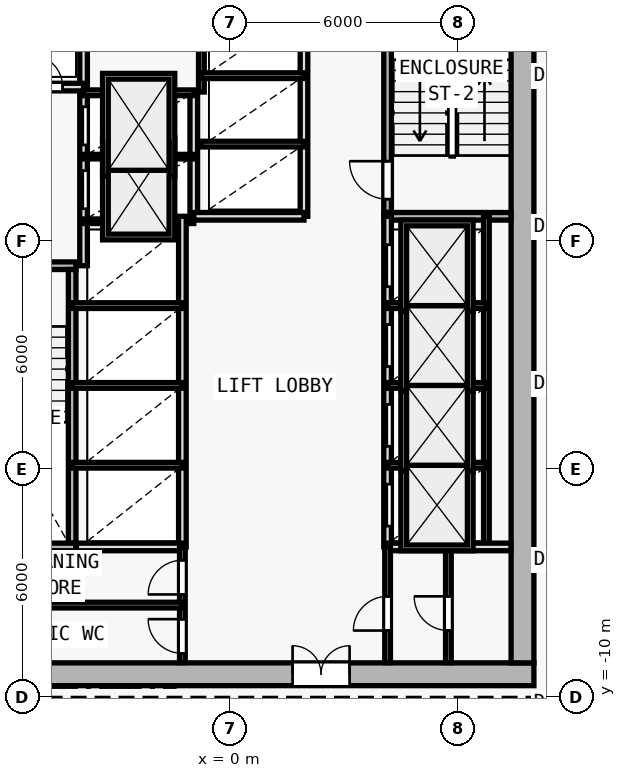
"""IFC4 building model, lengths in metres.
Left out: names, types, materials, properties, quantities, classifications, styles, units other than length and angle.
Written with IfcOpenShell. Run it as: python <this file> out.ifc"""

import sys

from ifc_helpers import new_model, si_unit, direction, frame, frame_2d, origin, origin_2d, place, context, subcontext, project, spatial, rectangle, i_section, extrude, element, fill, save


model = new_model("IFC4")
c1 = context("Model", 3, precision=1e-05, world=origin(), true_north=direction((0.0, 1.0)))
c2 = subcontext(c1, "Body", "Model", "MODEL_VIEW")
j1 = project(units=[si_unit("LENGTHUNIT", "METRE"), si_unit("PLANEANGLEUNIT", "RADIAN")], contexts=[c1])
p1 = place(None, origin())
s1 = spatial("IfcSite", under=j1, at=p1, CompositionType="ELEMENT")
p2 = place(p1, origin())
s2 = spatial("IfcBuilding", under=s1, at=p2, CompositionType="ELEMENT")
p3 = place(p2, frame((0.0, 0.0, 66.0)))
s3 = spatial("IfcBuildingStorey", under=s2, at=p3, CompositionType="ELEMENT", Elevation=66.0)
for number, where, z_axis, x_axis in (
    (1, (7.7, -9.4, 0.0), (0.0, 0.0, 1.0), (1.0, 0.0, 0.0)),
    (2, (0.0, -9.4, 0.0), (0.0, 0.0, 1.0), (1.0, 0.0, 0.0)),
    (3, (7.7, 0.4, 0.0), (0.0, 0.0, 1.0), (1.0, 0.0, 0.0)),
):
    element("IfcColumn", number, at=place(p3, frame(where, z_axis=z_axis, x_axis=x_axis)), inside=s3, PredefinedType="COLUMN", context=c2, shape_type="SweptSolid", body=[
        extrude(i_section(OverallWidth=0.416, OverallDepth=0.446, WebThickness=0.025, FlangeThickness=0.04, FilletRadius=0.015, at=origin_2d()), origin(), (0.0, 0.0, 1.0), 3.6),
    ])
p4 = place(p3, frame((-8.0, -9.4, 0.0), z_axis=(0.0, 0.0, 1.0), x_axis=(1.0, 0.0, 0.0)))
e4 = element("IfcWall", 4, at=p4, inside=s3, PredefinedType="SHEAR", context=c2, shape_type="SweptSolid", body=[
    extrude(rectangle(XDim=16.0, YDim=0.6, at=frame_2d((8.0, 0.0))), origin(), (0.0, 0.0, 1.0), 3.35),
])
p5 = place(p4, frame((9.65, 0.0, 0.0)))
e5 = element("IfcOpeningElement", 5, at=p5, cuts=e4, PredefinedType="OPENING", context=c2, shape_type="SweptSolid", body=[
    extrude(rectangle(XDim=1.5, YDim=2.2, at=frame_2d((0.75, 1.1))), frame((0.0, 0.31, 0.0), z_axis=(0.0, -1.0, 0.0), x_axis=(1.0, 0.0, 0.0)), (0.0, 0.0, 1.0), 0.62),
])
p6 = place(p3, frame((7.7, 9.9, 0.0), z_axis=(0.0, 0.0, 1.0), x_axis=(0.0, -1.0, 0.0)))
e6 = element("IfcWall", 6, at=p6, inside=s3, PredefinedType="SHEAR", context=c2, shape_type="SweptSolid", body=[
    extrude(rectangle(XDim=19.0, YDim=0.6, at=frame_2d((9.5, 0.0))), origin(), (0.0, 0.0, 1.0), 3.35),
])
p7 = place(p3, frame((-7.4, 1.35, 0.0), z_axis=(0.0, 0.0, 1.0), x_axis=(1.0, 0.0, 0.0)))
e7 = element("IfcWall", 7, at=p7, inside=s3, PredefinedType="SOLIDWALL", context=c2, shape_type="SweptSolid", body=[
    extrude(rectangle(XDim=3.35, YDim=0.2, at=frame_2d((1.675, 0.0))), origin(), (0.0, 0.0, 1.0), 3.35),
])
p8 = place(p7, frame((0.65, 0.0, 0.0)))
e8 = element("IfcOpeningElement", 8, at=p8, cuts=e7, PredefinedType="OPENING", context=c2, shape_type="SweptSolid", body=[
    extrude(rectangle(XDim=1.0, YDim=2.15, at=frame_2d((0.5, 1.075))), frame((0.0, 0.11, 0.0), z_axis=(0.0, -1.0, 0.0), x_axis=(1.0, 0.0, 0.0)), (0.0, 0.0, 1.0), 0.22),
])
p9 = place(p3, frame((-4.15, -5.95, 0.0), z_axis=(0.0, 0.0, 1.0), x_axis=(0.0, 1.0, 0.0)))
e9 = element("IfcWall", 9, at=p9, inside=s3, PredefinedType="SOLIDWALL", context=c2, shape_type="SweptSolid", body=[
    extrude(rectangle(XDim=7.2, YDim=0.2, at=frame_2d((3.6, 0.0))), origin(), (0.0, 0.0, 1.0), 3.35),
])
p10 = place(p3, frame((-3.85, 1.35, 0.0), z_axis=(0.0, 0.0, 1.0), x_axis=(0.0, 1.0, 0.0)))
e10 = element("IfcWall", 10, at=p10, inside=s3, PredefinedType="SOLIDWALL", context=c2, shape_type="SweptSolid", body=[
    extrude(rectangle(XDim=8.545, YDim=0.2, at=frame_2d((4.272, 0.0))), origin(), (0.0, 0.0, 1.0), 3.35),
])
p11 = place(p10, frame((1.5, 0.0, 0.0)))
e11 = element("IfcOpeningElement", 11, at=p11, cuts=e10, PredefinedType="OPENING", context=c2, shape_type="SweptSolid", body=[
    extrude(rectangle(XDim=1.0, YDim=2.15, at=frame_2d((0.5, 1.075))), frame((0.0, 0.11, 0.0), z_axis=(0.0, -1.0, 0.0), x_axis=(1.0, 0.0, 0.0)), (0.0, 0.0, 1.0), 0.22),
])
p12 = place(p10, frame((3.18, 0.0, 0.0)))
e12 = element("IfcOpeningElement", 12, at=p12, cuts=e10, PredefinedType="OPENING", context=c2, shape_type="SweptSolid", body=[
    extrude(rectangle(XDim=1.0, YDim=2.15, at=frame_2d((0.5, 1.075))), frame((0.0, 0.11, 0.0), z_axis=(0.0, -1.0, 0.0), x_axis=(1.0, 0.0, 0.0)), (0.0, 0.0, 1.0), 0.22),
])
p13 = place(p3, frame((-7.395, 6.05, 0.0), z_axis=(0.0, 0.0, 1.0), x_axis=(1.0, 0.0, 0.0)))
e13 = element("IfcWall", 13, at=p13, inside=s3, PredefinedType="SOLIDWALL", context=c2, shape_type="SweptSolid", body=[
    extrude(rectangle(XDim=3.545, YDim=0.2, at=frame_2d((1.772, 0.0))), origin(), (0.0, 0.0, 1.0), 3.35),
])
p14 = place(p13, frame((0.345, 0.0, 0.0)))
e14 = element("IfcOpeningElement", 14, at=p14, cuts=e13, PredefinedType="OPENING", context=c2, shape_type="SweptSolid", body=[
    extrude(rectangle(XDim=0.85, YDim=2.1, at=frame_2d((0.425, 1.05))), frame((0.0, 0.11, 0.0), z_axis=(0.0, -1.0, 0.0), x_axis=(1.0, 0.0, 0.0)), (0.0, 0.0, 1.0), 0.22),
])
p15 = place(p13, frame((2.145, 0.0, 0.0)))
e15 = element("IfcOpeningElement", 15, at=p15, cuts=e13, PredefinedType="OPENING", context=c2, shape_type="SweptSolid", body=[
    extrude(rectangle(XDim=0.85, YDim=2.1, at=frame_2d((0.425, 1.05))), frame((0.0, 0.11, 0.0), z_axis=(0.0, -1.0, 0.0), x_axis=(1.0, 0.0, 0.0)), (0.0, 0.0, 1.0), 0.22),
])
p16 = place(p3, frame((4.15, 2.75, 0.0), z_axis=(0.0, 0.0, 1.0), x_axis=(0.0, 1.0, 0.0)))
e16 = element("IfcWall", 16, at=p16, inside=s3, PredefinedType="SOLIDWALL", context=c2, shape_type="SweptSolid", body=[
    extrude(rectangle(XDim=7.15, YDim=0.2, at=frame_2d((3.575, 0.0))), origin(), (0.0, 0.0, 1.0), 3.35),
])
p17 = place(p16, frame((0.35, 0.0, 0.0)))
e17 = element("IfcOpeningElement", 17, at=p17, cuts=e16, PredefinedType="OPENING", context=c2, shape_type="SweptSolid", body=[
    extrude(rectangle(XDim=1.0, YDim=2.15, at=frame_2d((0.5, 1.075))), frame((0.0, 0.11, 0.0), z_axis=(0.0, -1.0, 0.0), x_axis=(1.0, 0.0, 0.0)), (0.0, 0.0, 1.0), 0.22),
])
p18 = place(p3, frame((4.05, 2.65, 0.0), z_axis=(0.0, 0.0, 1.0), x_axis=(1.0, 0.0, 0.0)))
e18 = element("IfcWall", 18, at=p18, inside=s3, PredefinedType="SOLIDWALL", context=c2, shape_type="SweptSolid", body=[
    extrude(rectangle(XDim=3.35, YDim=0.2, at=frame_2d((1.675, 0.0))), origin(), (0.0, 0.0, 1.0), 3.35),
])
p19 = place(p3, frame((-0.95, 2.65, 0.0), z_axis=(0.0, 0.0, 1.0), x_axis=(0.0, 1.0, 0.0)))
e19 = element("IfcWall", 19, at=p19, inside=s3, PredefinedType="SOLIDWALL", context=c2, shape_type="SweptSolid", body=[
    extrude(rectangle(XDim=3.27, YDim=0.2, at=frame_2d((1.635, 0.0))), origin(), (0.0, 0.0, 1.0), 3.35),
])
for number, where, z_axis, x_axis in (
    (20, (-3.85, 2.52, 0.0), (0.0, 0.0, 1.0), (1.0, 0.0, 0.0)),
    (21, (-3.85, 4.22, 0.0), (0.0, 0.0, 1.0), (1.0, 0.0, 0.0)),
):
    element("IfcWall", number, at=place(p3, frame(where, z_axis=z_axis, x_axis=x_axis)), inside=s3, PredefinedType="PARTITIONING", context=c2, shape_type="SweptSolid", body=[
        extrude(rectangle(XDim=2.9, YDim=0.12, at=frame_2d((1.45, 0.0))), origin(), (0.0, 0.0, 1.0), 3.35),
    ])
p20 = place(p3, frame((-3.85, 5.9, 0.0), z_axis=(0.0, 0.0, 1.0), x_axis=(1.0, 0.0, 0.0)))
e22 = element("IfcWall", 22, at=p20, inside=s3, PredefinedType="PARTITIONING", context=c2, shape_type="SweptSolid", body=[
    extrude(rectangle(XDim=2.9, YDim=0.15, at=frame_2d((1.45, 0.0))), origin(), (0.0, 0.0, 1.0), 3.35),
])
p21 = place(p3, frame((4.15, -6.05, 0.0), z_axis=(0.0, 0.0, 1.0), x_axis=(0.0, 1.0, 0.0)))
e23 = element("IfcWall", 23, at=p21, inside=s3, PredefinedType="SOLIDWALL", context=c2, shape_type="SweptSolid", body=[
    extrude(rectangle(XDim=8.7, YDim=0.2, at=frame_2d((4.35, 0.0))), origin(), (0.0, 0.0, 1.0), 3.35),
])
p22 = place(p21, frame((0.55, 0.0, 0.0)))
e24 = element("IfcOpeningElement", 24, at=p22, cuts=e23, PredefinedType="OPENING", context=c2, shape_type="SweptSolid", body=[
    extrude(rectangle(XDim=1.1, YDim=2.15, at=frame_2d((0.55, 1.075))), frame((0.0, 0.11, 0.0), z_axis=(0.0, -1.0, 0.0), x_axis=(1.0, 0.0, 0.0)), (0.0, 0.0, 1.0), 0.22),
])
p23 = place(p21, frame((2.65, 0.0, 0.0)))
e25 = element("IfcOpeningElement", 25, at=p23, cuts=e23, PredefinedType="OPENING", context=c2, shape_type="SweptSolid", body=[
    extrude(rectangle(XDim=1.1, YDim=2.15, at=frame_2d((0.55, 1.075))), frame((0.0, 0.11, 0.0), z_axis=(0.0, -1.0, 0.0), x_axis=(1.0, 0.0, 0.0)), (0.0, 0.0, 1.0), 0.22),
])
p24 = place(p21, frame((4.75, 0.0, 0.0)))
e26 = element("IfcOpeningElement", 26, at=p24, cuts=e23, PredefinedType="OPENING", context=c2, shape_type="SweptSolid", body=[
    extrude(rectangle(XDim=1.1, YDim=2.15, at=frame_2d((0.55, 1.075))), frame((0.0, 0.11, 0.0), z_axis=(0.0, -1.0, 0.0), x_axis=(1.0, 0.0, 0.0)), (0.0, 0.0, 1.0), 0.22),
])
p25 = place(p21, frame((6.85, 0.0, 0.0)))
e27 = element("IfcOpeningElement", 27, at=p25, cuts=e23, PredefinedType="OPENING", context=c2, shape_type="SweptSolid", body=[
    extrude(rectangle(XDim=1.1, YDim=2.15, at=frame_2d((0.55, 1.075))), frame((0.0, 0.11, 0.0), z_axis=(0.0, -1.0, 0.0), x_axis=(1.0, 0.0, 0.0)), (0.0, 0.0, 1.0), 0.22),
])
p26 = place(p3, frame((6.75, -6.05, 0.0), z_axis=(0.0, 0.0, 1.0), x_axis=(0.0, 1.0, 0.0)))
e28 = element("IfcWall", 28, at=p26, inside=s3, PredefinedType="PARTITIONING", context=c2, shape_type="SweptSolid", body=[
    extrude(rectangle(XDim=8.7, YDim=0.15, at=frame_2d((4.35, 0.0))), origin(), (0.0, 0.0, 1.0), 3.35),
])
for number, where, z_axis, x_axis in (
    (29, (4.15, -3.9, 0.0), (0.0, 0.0, 1.0), (1.0, 0.0, 0.0)),
    (30, (4.15, -1.8, 0.0), (0.0, 0.0, 1.0), (1.0, 0.0, 0.0)),
    (31, (4.15, 0.3, 0.0), (0.0, 0.0, 1.0), (1.0, 0.0, 0.0)),
):
    element("IfcWall", number, at=place(p3, frame(where, z_axis=z_axis, x_axis=x_axis)), inside=s3, PredefinedType="PARTITIONING", context=c2, shape_type="SweptSolid", body=[
        extrude(rectangle(XDim=2.6, YDim=0.15, at=frame_2d((1.3, 0.0))), origin(), (0.0, 0.0, 1.0), 3.35),
    ])
p27 = place(p3, frame((-1.25, -6.05, 0.0), z_axis=(0.0, 0.0, 1.0), x_axis=(0.0, 1.0, 0.0)))
e32 = element("IfcWall", 32, at=p27, inside=s3, PredefinedType="SOLIDWALL", context=c2, shape_type="SweptSolid", body=[
    extrude(rectangle(XDim=8.7, YDim=0.2, at=frame_2d((4.35, 0.0))), origin(), (0.0, 0.0, 1.0), 3.35),
])
for number, where, z_axis, x_axis in (
    (33, (-4.15, -3.9, 0.0), (0.0, 0.0, 1.0), (1.0, 0.0, 0.0)),
    (34, (-4.15, -1.8, 0.0), (0.0, 0.0, 1.0), (1.0, 0.0, 0.0)),
    (35, (-4.15, 0.3, 0.0), (0.0, 0.0, 1.0), (1.0, 0.0, 0.0)),
):
    element("IfcWall", number, at=place(p3, frame(where, z_axis=z_axis, x_axis=x_axis)), inside=s3, PredefinedType="PARTITIONING", context=c2, shape_type="SweptSolid", body=[
        extrude(rectangle(XDim=2.9, YDim=0.15, at=frame_2d((1.45, 0.0))), origin(), (0.0, 0.0, 1.0), 3.35),
    ])
p28 = place(p3, frame((1.95, 2.65, 0.0), z_axis=(0.0, 0.0, 1.0), x_axis=(0.0, 1.0, 0.0)))
e36 = element("IfcWall", 36, at=p28, inside=s3, PredefinedType="SOLIDWALL", context=c2, shape_type="SweptSolid", body=[
    extrude(rectangle(XDim=7.245, YDim=0.2, at=frame_2d((3.623, 0.0))), origin(), (0.0, 0.0, 1.0), 3.35),
])
p29 = place(p3, frame((-0.95, 2.65, 0.0), z_axis=(0.0, 0.0, 1.0), x_axis=(1.0, 0.0, 0.0)))
e37 = element("IfcWall", 37, at=p29, inside=s3, PredefinedType="SOLIDWALL", context=c2, shape_type="SweptSolid", body=[
    extrude(rectangle(XDim=2.9, YDim=0.2, at=frame_2d((1.45, 0.0))), origin(), (0.0, 0.0, 1.0), 3.35),
])
p30 = place(p3, frame((-0.75, 5.92, 0.0), z_axis=(0.0, 0.0, 1.0), x_axis=(0.0, 1.0, 0.0)))
e38 = element("IfcWall", 38, at=p30, inside=s3, PredefinedType="PARTITIONING", context=c2, shape_type="SweptSolid", body=[
    extrude(rectangle(XDim=3.975, YDim=0.15, at=frame_2d((1.988, 0.0))), origin(), (0.0, 0.0, 1.0), 3.35),
])
for number, where, z_axis, x_axis in (
    (39, (-0.75, 4.55, 0.0), (0.0, 0.0, 1.0), (1.0, 0.0, 0.0)),
    (40, (-0.75, 6.35, 0.0), (0.0, 0.0, 1.0), (1.0, 0.0, 0.0)),
):
    element("IfcWall", number, at=place(p3, frame(where, z_axis=z_axis, x_axis=x_axis)), inside=s3, PredefinedType="PARTITIONING", context=c2, shape_type="SweptSolid", body=[
        extrude(rectangle(XDim=2.7, YDim=0.15, at=frame_2d((1.35, 0.0))), origin(), (0.0, 0.0, 1.0), 3.35),
    ])
p31 = place(p3, frame((-7.4, -6.05, 0.0), z_axis=(0.0, 0.0, 1.0), x_axis=(1.0, 0.0, 0.0)))
e41 = element("IfcWall", 41, at=p31, inside=s3, PredefinedType="SOLIDWALL", context=c2, shape_type="SweptSolid", body=[
    extrude(rectangle(XDim=3.35, YDim=0.2, at=frame_2d((1.675, 0.0))), origin(), (0.0, 0.0, 1.0), 3.35),
])
p32 = place(p3, frame((-4.04, -6.05, 0.0), z_axis=(0.0, 0.0, 1.0), x_axis=(1.0, 0.0, 0.0)))
e42 = element("IfcWall", 42, at=p32, inside=s3, PredefinedType="SOLIDWALL", context=c2, shape_type="SweptSolid", body=[
    extrude(rectangle(XDim=2.79, YDim=0.2, at=frame_2d((1.395, 0.0))), origin(), (0.0, 0.0, 1.0), 3.35),
])
p33 = place(p3, frame((4.15, -6.05, 0.0), z_axis=(0.0, 0.0, 1.0), x_axis=(1.0, 0.0, 0.0)))
e43 = element("IfcWall", 43, at=p33, inside=s3, PredefinedType="SOLIDWALL", context=c2, shape_type="SweptSolid", body=[
    extrude(rectangle(XDim=3.245, YDim=0.2, at=frame_2d((1.623, 0.0))), origin(), (0.0, 0.0, 1.0), 3.35),
])
p34 = place(p3, frame((-1.25, -9.095, 0.0), z_axis=(0.0, 0.0, 1.0), x_axis=(0.0, 1.0, 0.0)))
e44 = element("IfcWall", 44, at=p34, inside=s3, PredefinedType="PARTITIONING", context=c2, shape_type="SweptSolid", body=[
    extrude(rectangle(XDim=3.045, YDim=0.15, at=frame_2d((1.522, 0.0))), origin(), (0.0, 0.0, 1.0), 3.35),
])
p35 = place(p34, frame((1.795, 0.0, 0.0)))
e45 = element("IfcOpeningElement", 45, at=p35, cuts=e44, PredefinedType="OPENING", context=c2, shape_type="SweptSolid", body=[
    extrude(rectangle(XDim=0.9, YDim=2.1, at=frame_2d((0.45, 1.05))), frame((0.0, 0.085, 0.0), z_axis=(0.0, -1.0, 0.0), x_axis=(1.0, 0.0, 0.0)), (0.0, 0.0, 1.0), 0.17),
])
p36 = place(p34, frame((0.245, 0.0, 0.0)))
e46 = element("IfcOpeningElement", 46, at=p36, cuts=e44, PredefinedType="OPENING", context=c2, shape_type="SweptSolid", body=[
    extrude(rectangle(XDim=0.9, YDim=2.1, at=frame_2d((0.45, 1.05))), frame((0.0, 0.085, 0.0), z_axis=(0.0, -1.0, 0.0), x_axis=(1.0, 0.0, 0.0)), (0.0, 0.0, 1.0), 0.17),
])
p37 = place(p3, frame((4.15, -9.095, 0.0), z_axis=(0.0, 0.0, 1.0), x_axis=(0.0, 1.0, 0.0)))
e47 = element("IfcWall", 47, at=p37, inside=s3, PredefinedType="PARTITIONING", context=c2, shape_type="SweptSolid", body=[
    extrude(rectangle(XDim=3.045, YDim=0.15, at=frame_2d((1.522, 0.0))), origin(), (0.0, 0.0, 1.0), 3.35),
])
p38 = place(p37, frame((0.845, 0.0, 0.0)))
e48 = element("IfcOpeningElement", 48, at=p38, cuts=e47, PredefinedType="OPENING", context=c2, shape_type="SweptSolid", body=[
    extrude(rectangle(XDim=0.9, YDim=2.1, at=frame_2d((0.45, 1.05))), frame((0.0, 0.085, 0.0), z_axis=(0.0, -1.0, 0.0), x_axis=(1.0, 0.0, 0.0)), (0.0, 0.0, 1.0), 0.17),
])
p39 = place(p3, frame((-7.395, -7.58, 0.0), z_axis=(0.0, 0.0, 1.0), x_axis=(1.0, 0.0, 0.0)))
e49 = element("IfcWall", 49, at=p39, inside=s3, PredefinedType="PARTITIONING", context=c2, shape_type="SweptSolid", body=[
    extrude(rectangle(XDim=6.145, YDim=0.15, at=frame_2d((3.073, 0.0))), origin(), (0.0, 0.0, 1.0), 3.35),
])
p40 = place(p3, frame((5.75, -9.095, 0.0), z_axis=(0.0, 0.0, 1.0), x_axis=(0.0, 1.0, 0.0)))
e50 = element("IfcWall", 50, at=p40, inside=s3, PredefinedType="PARTITIONING", context=c2, shape_type="SweptSolid", body=[
    extrude(rectangle(XDim=3.045, YDim=0.15, at=frame_2d((1.522, 0.0))), origin(), (0.0, 0.0, 1.0), 3.35),
])
p41 = place(p40, frame((0.845, 0.0, 0.0)))
e51 = element("IfcOpeningElement", 51, at=p41, cuts=e50, PredefinedType="OPENING", context=c2, shape_type="SweptSolid", body=[
    extrude(rectangle(XDim=0.9, YDim=2.1, at=frame_2d((0.45, 1.05))), frame((0.0, 0.085, 0.0), z_axis=(0.0, -1.0, 0.0), x_axis=(1.0, 0.0, 0.0)), (0.0, 0.0, 1.0), 0.17),
])
p42 = place(p5, origin())
e52 = element("IfcDoor", 52, at=p42, inside=s3, OperationType="DOUBLE_DOOR_SINGLE_SWING", PredefinedType="DOOR", context=c2, shape_type="SweptSolid", body=[
    extrude(rectangle(XDim=1.5, YDim=2.2, at=frame_2d((0.75, 1.1))), frame((0.0, 0.025, 0.0), z_axis=(0.0, -1.0, 0.0), x_axis=(1.0, 0.0, 0.0)), (0.0, 0.0, 1.0), 0.05),
])
fill(e5, e52)
p43 = place(p15, origin())
e53 = element("IfcDoor", 53, at=p43, inside=s3, OperationType="SINGLE_SWING_LEFT", PredefinedType="DOOR", context=c2, shape_type="SweptSolid", body=[
    extrude(rectangle(XDim=0.85, YDim=2.1, at=frame_2d((0.425, 1.05))), frame((0.0, 0.025, 0.0), z_axis=(0.0, -1.0, 0.0), x_axis=(1.0, 0.0, 0.0)), (0.0, 0.0, 1.0), 0.05),
])
fill(e15, e53)
p44 = place(p17, origin())
e54 = element("IfcDoor", 54, at=p44, inside=s3, OperationType="SINGLE_SWING_RIGHT", PredefinedType="DOOR", context=c2, shape_type="SweptSolid", body=[
    extrude(rectangle(XDim=1.0, YDim=2.15, at=frame_2d((0.5, 1.075))), frame((0.0, 0.025, 0.0), z_axis=(0.0, -1.0, 0.0), x_axis=(1.0, 0.0, 0.0)), (0.0, 0.0, 1.0), 0.05),
])
fill(e17, e54)
p45 = place(p22, origin())
e55 = element("IfcDoor", 55, at=p45, inside=s3, OperationType="DOUBLE_DOOR_SLIDING", PredefinedType="DOOR", context=c2, shape_type="SweptSolid", body=[
    extrude(rectangle(XDim=1.1, YDim=2.15, at=frame_2d((0.55, 1.075))), frame((0.0, 0.025, 0.0), z_axis=(0.0, -1.0, 0.0), x_axis=(1.0, 0.0, 0.0)), (0.0, 0.0, 1.0), 0.05),
])
fill(e24, e55)
p46 = place(p23, origin())
e56 = element("IfcDoor", 56, at=p46, inside=s3, OperationType="DOUBLE_DOOR_SLIDING", PredefinedType="DOOR", context=c2, shape_type="SweptSolid", body=[
    extrude(rectangle(XDim=1.1, YDim=2.15, at=frame_2d((0.55, 1.075))), frame((0.0, 0.025, 0.0), z_axis=(0.0, -1.0, 0.0), x_axis=(1.0, 0.0, 0.0)), (0.0, 0.0, 1.0), 0.05),
])
fill(e25, e56)
p47 = place(p24, origin())
e57 = element("IfcDoor", 57, at=p47, inside=s3, OperationType="DOUBLE_DOOR_SLIDING", PredefinedType="DOOR", context=c2, shape_type="SweptSolid", body=[
    extrude(rectangle(XDim=1.1, YDim=2.15, at=frame_2d((0.55, 1.075))), frame((0.0, 0.025, 0.0), z_axis=(0.0, -1.0, 0.0), x_axis=(1.0, 0.0, 0.0)), (0.0, 0.0, 1.0), 0.05),
])
fill(e26, e57)
p48 = place(p25, origin())
e58 = element("IfcDoor", 58, at=p48, inside=s3, OperationType="DOUBLE_DOOR_SLIDING", PredefinedType="DOOR", context=c2, shape_type="SweptSolid", body=[
    extrude(rectangle(XDim=1.1, YDim=2.15, at=frame_2d((0.55, 1.075))), frame((0.0, 0.025, 0.0), z_axis=(0.0, -1.0, 0.0), x_axis=(1.0, 0.0, 0.0)), (0.0, 0.0, 1.0), 0.05),
])
fill(e27, e58)
p49 = place(p11, origin())
e59 = element("IfcDoor", 59, at=p49, inside=s3, OperationType="DOUBLE_DOOR_SLIDING", PredefinedType="DOOR", context=c2, shape_type="SweptSolid", body=[
    extrude(rectangle(XDim=1.0, YDim=2.15, at=frame_2d((0.5, 1.075))), frame((0.0, 0.025, 0.0), z_axis=(0.0, -1.0, 0.0), x_axis=(1.0, 0.0, 0.0)), (0.0, 0.0, 1.0), 0.05),
])
fill(e11, e59)
p50 = place(p12, origin())
e60 = element("IfcDoor", 60, at=p50, inside=s3, OperationType="DOUBLE_DOOR_SLIDING", PredefinedType="DOOR", context=c2, shape_type="SweptSolid", body=[
    extrude(rectangle(XDim=1.0, YDim=2.15, at=frame_2d((0.5, 1.075))), frame((0.0, 0.025, 0.0), z_axis=(0.0, -1.0, 0.0), x_axis=(1.0, 0.0, 0.0)), (0.0, 0.0, 1.0), 0.05),
])
fill(e12, e60)
p51 = place(p35, origin())
e61 = element("IfcDoor", 61, at=p51, inside=s3, OperationType="SINGLE_SWING_LEFT", PredefinedType="DOOR", context=c2, shape_type="SweptSolid", body=[
    extrude(rectangle(XDim=0.9, YDim=2.1, at=frame_2d((0.45, 1.05))), frame((0.0, 0.025, 0.0), z_axis=(0.0, -1.0, 0.0), x_axis=(1.0, 0.0, 0.0)), (0.0, 0.0, 1.0), 0.05),
])
fill(e45, e61)
p52 = place(p36, origin())
e62 = element("IfcDoor", 62, at=p52, inside=s3, OperationType="SINGLE_SWING_RIGHT", PredefinedType="DOOR", context=c2, shape_type="SweptSolid", body=[
    extrude(rectangle(XDim=0.9, YDim=2.1, at=frame_2d((0.45, 1.05))), frame((0.0, 0.025, 0.0), z_axis=(0.0, -1.0, 0.0), x_axis=(1.0, 0.0, 0.0)), (0.0, 0.0, 1.0), 0.05),
])
fill(e46, e62)
p53 = place(p38, origin())
e63 = element("IfcDoor", 63, at=p53, inside=s3, OperationType="SINGLE_SWING_LEFT", PredefinedType="DOOR", context=c2, shape_type="SweptSolid", body=[
    extrude(rectangle(XDim=0.9, YDim=2.1, at=frame_2d((0.45, 1.05))), frame((0.0, 0.025, 0.0), z_axis=(0.0, -1.0, 0.0), x_axis=(1.0, 0.0, 0.0)), (0.0, 0.0, 1.0), 0.05),
])
fill(e48, e63)
p54 = place(p41, origin())
e64 = element("IfcDoor", 64, at=p54, inside=s3, OperationType="SINGLE_SWING_RIGHT", PredefinedType="DOOR", context=c2, shape_type="SweptSolid", body=[
    extrude(rectangle(XDim=0.9, YDim=2.1, at=frame_2d((0.45, 1.05))), frame((0.0, 0.025, 0.0), z_axis=(0.0, -1.0, 0.0), x_axis=(1.0, 0.0, 0.0)), (0.0, 0.0, 1.0), 0.05),
])
fill(e51, e64)
save(model, sys.argv[1])
